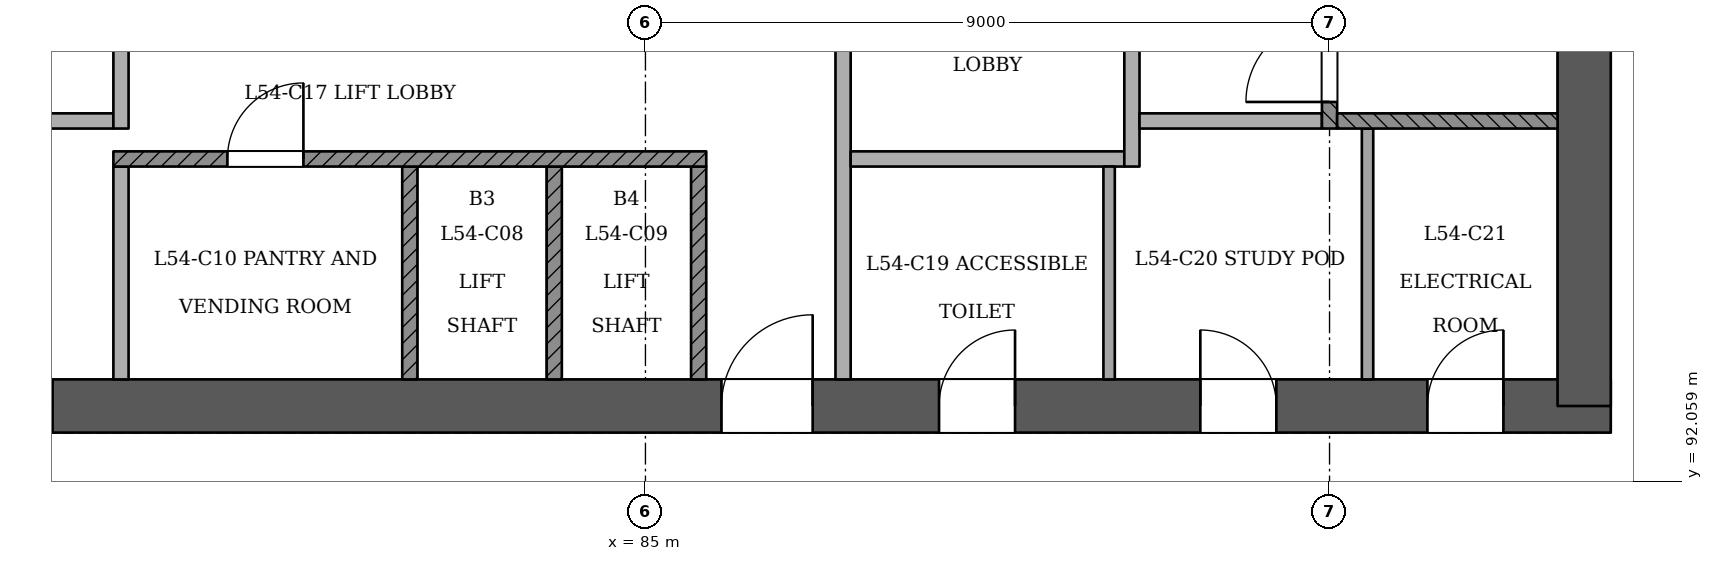
"""IFC4 building model, lengths in metres.
Left out: names, types, materials, properties, quantities, classifications, styles, units other than length and angle.
Written with IfcOpenShell. Run it as: python <this file> out.ifc"""

import sys

from ifc_helpers import new_model, si_unit, direction, frame, frame_2d, origin, place, context, subcontext, project, spatial, rectangle, extrude, element, fill, save


model = new_model("IFC4")
c1 = context("Model", 3, precision=1e-05, world=origin(), true_north=direction((0.0, 1.0)))
c2 = subcontext(c1, "Body", "Model", "MODEL_VIEW")
j1 = project(units=[si_unit("LENGTHUNIT", "METRE"), si_unit("PLANEANGLEUNIT", "RADIAN")], contexts=[c1])
p1 = place(None, origin())
s1 = spatial("IfcSite", under=j1, at=p1, CompositionType="ELEMENT")
p2 = place(p1, origin())
s2 = spatial("IfcBuilding", under=s1, at=p2, CompositionType="ELEMENT")
p3 = place(p2, frame((0.0, 0.0, 208.8)))
s3 = spatial("IfcBuildingStorey", under=s2, at=p3, CompositionType="ELEMENT", Elevation=208.8)
p4 = place(p3, frame((72.65, 93.05, 0.0), z_axis=(0.0, 0.0, 1.0), x_axis=(1.0, 0.0, 0.0)))
e1 = element("IfcWall", 1, at=p4, inside=s3, PredefinedType="SHEAR", context=c2, shape_type="SweptSolid", body=[
    extrude(rectangle(XDim=25.05, YDim=0.7, at=frame_2d((12.525, 0.0))), origin(), (0.0, 0.0, 1.0), 3.6),
])
p5 = place(p4, frame((1.15, 0.0, 0.0)))
e2 = element("IfcOpeningElement", 2, at=p5, cuts=e1, PredefinedType="OPENING", context=c2, shape_type="SweptSolid", body=[
    extrude(rectangle(XDim=1.2, YDim=2.1, at=frame_2d((0.6, 1.05))), frame((0.0, 0.36, 0.0), z_axis=(0.0, -1.0, 0.0), x_axis=(1.0, 0.0, 0.0)), (0.0, 0.0, 1.0), 0.721),
])
p6 = place(p4, frame((3.35, 0.0, 0.0)))
e3 = element("IfcOpeningElement", 3, at=p6, cuts=e1, PredefinedType="OPENING", context=c2, shape_type="SweptSolid", body=[
    extrude(rectangle(XDim=1.2, YDim=2.1, at=frame_2d((0.6, 1.05))), frame((0.0, 0.36, 0.0), z_axis=(0.0, -1.0, 0.0), x_axis=(1.0, 0.0, 0.0)), (0.0, 0.0, 1.0), 0.721),
])
p7 = place(p4, frame((13.35, 0.0, 0.0)))
e4 = element("IfcOpeningElement", 4, at=p7, cuts=e1, PredefinedType="OPENING", context=c2, shape_type="SweptSolid", body=[
    extrude(rectangle(XDim=1.2, YDim=2.1, at=frame_2d((0.6, 1.05))), frame((0.0, 0.36, 0.0), z_axis=(0.0, -1.0, 0.0), x_axis=(1.0, 0.0, 0.0)), (0.0, 0.0, 1.0), 0.721),
])
p8 = place(p4, frame((16.212, 0.0, 0.0)))
e5 = element("IfcOpeningElement", 5, at=p8, cuts=e1, PredefinedType="OPENING", context=c2, shape_type="SweptSolid", body=[
    extrude(rectangle(XDim=1.0, YDim=2.1, at=frame_2d((0.5, 1.05))), frame((0.0, 0.36, 0.0), z_axis=(0.0, -1.0, 0.0), x_axis=(1.0, 0.0, 0.0)), (0.0, 0.0, 1.0), 0.721),
])
p9 = place(p4, frame((19.65, 0.0, 0.0)))
e6 = element("IfcOpeningElement", 6, at=p9, cuts=e1, PredefinedType="OPENING", context=c2, shape_type="SweptSolid", body=[
    extrude(rectangle(XDim=1.0, YDim=2.1, at=frame_2d((0.5, 1.05))), frame((0.0, 0.36, 0.0), z_axis=(0.0, -1.0, 0.0), x_axis=(1.0, 0.0, 0.0)), (0.0, 0.0, 1.0), 0.721),
])
p10 = place(p4, frame((22.637, 0.0, 0.0)))
e7 = element("IfcOpeningElement", 7, at=p10, cuts=e1, PredefinedType="OPENING", context=c2, shape_type="SweptSolid", body=[
    extrude(rectangle(XDim=1.0, YDim=2.1, at=frame_2d((0.5, 1.05))), frame((0.0, 0.36, 0.0), z_axis=(0.0, -1.0, 0.0), x_axis=(1.0, 0.0, 0.0)), (0.0, 0.0, 1.0), 0.721),
])
p11 = place(p3, frame((97.35, 93.05, 0.0), z_axis=(0.0, 0.0, 1.0), x_axis=(0.0, 1.0, 0.0)))
e8 = element("IfcWall", 8, at=p11, inside=s3, PredefinedType="SHEAR", context=c2, shape_type="SweptSolid", body=[
    extrude(rectangle(XDim=11.05, YDim=0.7, at=frame_2d((5.525, 0.0))), origin(), (0.0, 0.0, 1.0), 3.6),
])
p12 = place(p3, frame((78.1, 93.4, 0.0), z_axis=(0.0, 0.0, 1.0), x_axis=(0.0, 1.0, 0.0)))
e9 = element("IfcWall", 9, at=p12, inside=s3, PredefinedType="PARTITIONING", context=c2, shape_type="SweptSolid", body=[
    extrude(rectangle(XDim=2.8, YDim=0.2, at=frame_2d((1.4, 0.0))), origin(), (0.0, 0.0, 1.0), 3.3),
])
for number, where, z_axis, x_axis in (
    (10, (81.9, 93.4, 0.0), (0.0, 0.0, 1.0), (0.0, 1.0, 0.0)),
    (11, (83.8, 93.4, 0.0), (0.0, 0.0, 1.0), (0.0, 1.0, 0.0)),
    (12, (85.7, 93.4, 0.0), (0.0, 0.0, 1.0), (0.0, 1.0, 0.0)),
):
    element("IfcWall", number, at=place(p3, frame(where, z_axis=z_axis, x_axis=x_axis)), inside=s3, PredefinedType="SOLIDWALL", context=c2, shape_type="SweptSolid", body=[
        extrude(rectangle(XDim=2.8, YDim=0.2, at=frame_2d((1.4, 0.0))), origin(), (0.0, 0.0, 1.0), 3.3),
    ])
p13 = place(p3, frame((87.6, 93.4, 0.0), z_axis=(0.0, 0.0, 1.0), x_axis=(0.0, 1.0, 0.0)))
e13 = element("IfcWall", 13, at=p13, inside=s3, PredefinedType="PARTITIONING", context=c2, shape_type="SweptSolid", body=[
    extrude(rectangle(XDim=7.0, YDim=0.2, at=frame_2d((3.5, 0.0))), origin(), (0.0, 0.0, 1.0), 3.3),
])
p14 = place(p13, frame((4.45, 0.0, 0.0)))
e14 = element("IfcOpeningElement", 14, at=p14, cuts=e13, PredefinedType="OPENING", context=c2, shape_type="SweptSolid", body=[
    extrude(rectangle(XDim=1.1, YDim=2.1, at=frame_2d((0.55, 1.05))), frame((0.0, 0.11, 0.0), z_axis=(0.0, -1.0, 0.0), x_axis=(1.0, 0.0, 0.0)), (0.0, 0.0, 1.0), 0.221),
])
p15 = place(p3, frame((91.1, 93.4, 0.0), z_axis=(0.0, 0.0, 1.0), x_axis=(0.0, 1.0, 0.0)))
e15 = element("IfcWall", 15, at=p15, inside=s3, PredefinedType="PARTITIONING", context=c2, shape_type="SweptSolid", body=[
    extrude(rectangle(XDim=2.8, YDim=0.15, at=frame_2d((1.4, 0.0))), origin(), (0.0, 0.0, 1.0), 3.3),
])
p16 = place(p3, frame((94.5, 93.4, 0.0), z_axis=(0.0, 0.0, 1.0), x_axis=(0.0, 1.0, 0.0)))
e16 = element("IfcWall", 16, at=p16, inside=s3, PredefinedType="PARTITIONING", context=c2, shape_type="SweptSolid", body=[
    extrude(rectangle(XDim=3.3, YDim=0.15, at=frame_2d((1.65, 0.0))), origin(), (0.0, 0.0, 1.0), 3.3),
])
p17 = place(p3, frame((78.0, 96.3, 0.0), z_axis=(0.0, 0.0, 1.0), x_axis=(1.0, 0.0, 0.0)))
e17 = element("IfcWall", 17, at=p17, inside=s3, PredefinedType="SOLIDWALL", context=c2, shape_type="SweptSolid", body=[
    extrude(rectangle(XDim=7.8, YDim=0.2, at=frame_2d((3.9, 0.0))), origin(), (0.0, 0.0, 1.0), 3.3),
])
p18 = place(p17, frame((1.5, 0.0, 0.0)))
e18 = element("IfcOpeningElement", 18, at=p18, cuts=e17, PredefinedType="OPENING", context=c2, shape_type="SweptSolid", body=[
    extrude(rectangle(XDim=1.0, YDim=2.1, at=frame_2d((0.5, 1.05))), frame((0.0, 0.11, 0.0), z_axis=(0.0, -1.0, 0.0), x_axis=(1.0, 0.0, 0.0)), (0.0, 0.0, 1.0), 0.221),
])
p19 = place(p3, frame((87.7, 96.3, 0.0), z_axis=(0.0, 0.0, 1.0), x_axis=(1.0, 0.0, 0.0)))
e19 = element("IfcWall", 19, at=p19, inside=s3, PredefinedType="PARTITIONING", context=c2, shape_type="SweptSolid", body=[
    extrude(rectangle(XDim=3.6, YDim=0.2, at=frame_2d((1.8, 0.0))), origin(), (0.0, 0.0, 1.0), 3.3),
])
p20 = place(p3, frame((91.4, 96.2, 0.0), z_axis=(0.0, 0.0, 1.0), x_axis=(0.0, 1.0, 0.0)))
e20 = element("IfcWall", 20, at=p20, inside=s3, PredefinedType="PARTITIONING", context=c2, shape_type="SweptSolid", body=[
    extrude(rectangle(XDim=4.2, YDim=0.2, at=frame_2d((2.1, 0.0))), origin(), (0.0, 0.0, 1.0), 3.3),
])
p21 = place(p20, frame((2.45, 0.0, 0.0)))
e21 = element("IfcOpeningElement", 21, at=p21, cuts=e20, PredefinedType="OPENING", context=c2, shape_type="SweptSolid", body=[
    extrude(rectangle(XDim=1.1, YDim=2.1, at=frame_2d((0.55, 1.05))), frame((0.0, 0.11, 0.0), z_axis=(0.0, -1.0, 0.0), x_axis=(1.0, 0.0, 0.0)), (0.0, 0.0, 1.0), 0.221),
])
p22 = place(p3, frame((76.1, 96.8, 0.0), z_axis=(0.0, 0.0, 1.0), x_axis=(1.0, 0.0, 0.0)))
e22 = element("IfcWall", 22, at=p22, inside=s3, PredefinedType="PARTITIONING", context=c2, shape_type="SweptSolid", body=[
    extrude(rectangle(XDim=1.9, YDim=0.2, at=frame_2d((0.95, 0.0))), origin(), (0.0, 0.0, 1.0), 3.3),
])
p23 = place(p3, frame((78.1, 96.7, 0.0), z_axis=(0.0, 0.0, 1.0), x_axis=(0.0, 1.0, 0.0)))
e23 = element("IfcWall", 23, at=p23, inside=s3, PredefinedType="PARTITIONING", context=c2, shape_type="SweptSolid", body=[
    extrude(rectangle(XDim=3.7, YDim=0.2, at=frame_2d((1.85, 0.0))), origin(), (0.0, 0.0, 1.0), 3.3),
])
p24 = place(p23, frame((1.95, 0.0, 0.0)))
e24 = element("IfcOpeningElement", 24, at=p24, cuts=e23, PredefinedType="OPENING", context=c2, shape_type="SweptSolid", body=[
    extrude(rectangle(XDim=1.1, YDim=2.1, at=frame_2d((0.55, 1.05))), frame((0.0, 0.11, 0.0), z_axis=(0.0, -1.0, 0.0), x_axis=(1.0, 0.0, 0.0)), (0.0, 0.0, 1.0), 0.221),
])
p25 = place(p3, frame((91.5, 96.8, 0.0), z_axis=(0.0, 0.0, 1.0), x_axis=(1.0, 0.0, 0.0)))
e25 = element("IfcWall", 25, at=p25, inside=s3, PredefinedType="PARTITIONING", context=c2, shape_type="SweptSolid", body=[
    extrude(rectangle(XDim=2.4, YDim=0.2, at=frame_2d((1.2, 0.0))), origin(), (0.0, 0.0, 1.0), 3.3),
])
p26 = place(p3, frame((94.0, 96.7, 0.0), z_axis=(0.0, 0.0, 1.0), x_axis=(0.0, 1.0, 0.0)))
e26 = element("IfcWall", 26, at=p26, inside=s3, PredefinedType="SOLIDWALL", context=c2, shape_type="SweptSolid", body=[
    extrude(rectangle(XDim=3.7, YDim=0.2, at=frame_2d((1.85, 0.0))), origin(), (0.0, 0.0, 1.0), 3.3),
])
p27 = place(p26, frame((0.35, 0.0, 0.0)))
e27 = element("IfcOpeningElement", 27, at=p27, cuts=e26, PredefinedType="OPENING", context=c2, shape_type="SweptSolid", body=[
    extrude(rectangle(XDim=1.1, YDim=2.1, at=frame_2d((0.55, 1.05))), frame((0.0, 0.11, 0.0), z_axis=(0.0, -1.0, 0.0), x_axis=(1.0, 0.0, 0.0)), (0.0, 0.0, 1.0), 0.221),
])
p28 = place(p3, frame((94.1, 96.8, 0.0), z_axis=(0.0, 0.0, 1.0), x_axis=(1.0, 0.0, 0.0)))
e28 = element("IfcWall", 28, at=p28, inside=s3, PredefinedType="SOLIDWALL", context=c2, shape_type="SweptSolid", body=[
    extrude(rectangle(XDim=2.9, YDim=0.2, at=frame_2d((1.45, 0.0))), origin(), (0.0, 0.0, 1.0), 3.3),
])
p29 = place(p27, origin())
e29 = element("IfcDoor", 29, at=p29, inside=s3, OperationType="SINGLE_SWING_LEFT", PredefinedType="NOTDEFINED", context=c2, shape_type="SweptSolid", body=[
    extrude(rectangle(XDim=1.1, YDim=2.1, at=frame_2d((0.55, 1.05))), frame((0.0, 0.025, 0.0), z_axis=(0.0, -1.0, 0.0), x_axis=(1.0, 0.0, 0.0)), (0.0, 0.0, 1.0), 0.05),
])
fill(e27, e29)
p30 = place(p6, origin())
e30 = element("IfcDoor", 30, at=p30, inside=s3, OperationType="SINGLE_SWING_LEFT", PredefinedType="NOTDEFINED", context=c2, shape_type="SweptSolid", body=[
    extrude(rectangle(XDim=1.2, YDim=2.1, at=frame_2d((0.6, 1.05))), frame((0.0, 0.025, 0.0), z_axis=(0.0, -1.0, 0.0), x_axis=(1.0, 0.0, 0.0)), (0.0, 0.0, 1.0), 0.05),
])
fill(e3, e30)
p31 = place(p7, origin())
e31 = element("IfcDoor", 31, at=p31, inside=s3, OperationType="SINGLE_SWING_RIGHT", PredefinedType="NOTDEFINED", context=c2, shape_type="SweptSolid", body=[
    extrude(rectangle(XDim=1.2, YDim=2.1, at=frame_2d((0.6, 1.05))), frame((0.0, 0.025, 0.0), z_axis=(0.0, -1.0, 0.0), x_axis=(1.0, 0.0, 0.0)), (0.0, 0.0, 1.0), 0.05),
])
fill(e4, e31)
p32 = place(p8, origin())
e32 = element("IfcDoor", 32, at=p32, inside=s3, OperationType="SINGLE_SWING_RIGHT", PredefinedType="NOTDEFINED", context=c2, shape_type="SweptSolid", body=[
    extrude(rectangle(XDim=1.0, YDim=2.1, at=frame_2d((0.5, 1.05))), frame((0.0, 0.025, 0.0), z_axis=(0.0, -1.0, 0.0), x_axis=(1.0, 0.0, 0.0)), (0.0, 0.0, 1.0), 0.05),
])
fill(e5, e32)
p33 = place(p9, origin())
e33 = element("IfcDoor", 33, at=p33, inside=s3, OperationType="SINGLE_SWING_LEFT", PredefinedType="NOTDEFINED", context=c2, shape_type="SweptSolid", body=[
    extrude(rectangle(XDim=1.0, YDim=2.1, at=frame_2d((0.5, 1.05))), frame((0.0, 0.025, 0.0), z_axis=(0.0, -1.0, 0.0), x_axis=(1.0, 0.0, 0.0)), (0.0, 0.0, 1.0), 0.05),
])
fill(e6, e33)
p34 = place(p10, origin())
e34 = element("IfcDoor", 34, at=p34, inside=s3, OperationType="SINGLE_SWING_RIGHT", PredefinedType="NOTDEFINED", context=c2, shape_type="SweptSolid", body=[
    extrude(rectangle(XDim=1.0, YDim=2.1, at=frame_2d((0.5, 1.05))), frame((0.0, 0.025, 0.0), z_axis=(0.0, -1.0, 0.0), x_axis=(1.0, 0.0, 0.0)), (0.0, 0.0, 1.0), 0.05),
])
fill(e7, e34)
p35 = place(p18, origin())
e35 = element("IfcDoor", 35, at=p35, inside=s3, OperationType="SINGLE_SWING_RIGHT", PredefinedType="NOTDEFINED", context=c2, shape_type="SweptSolid", body=[
    extrude(rectangle(XDim=1.0, YDim=2.1, at=frame_2d((0.5, 1.05))), frame((0.0, 0.025, 0.0), z_axis=(0.0, -1.0, 0.0), x_axis=(1.0, 0.0, 0.0)), (0.0, 0.0, 1.0), 0.05),
])
fill(e18, e35)
save(model, sys.argv[1])
